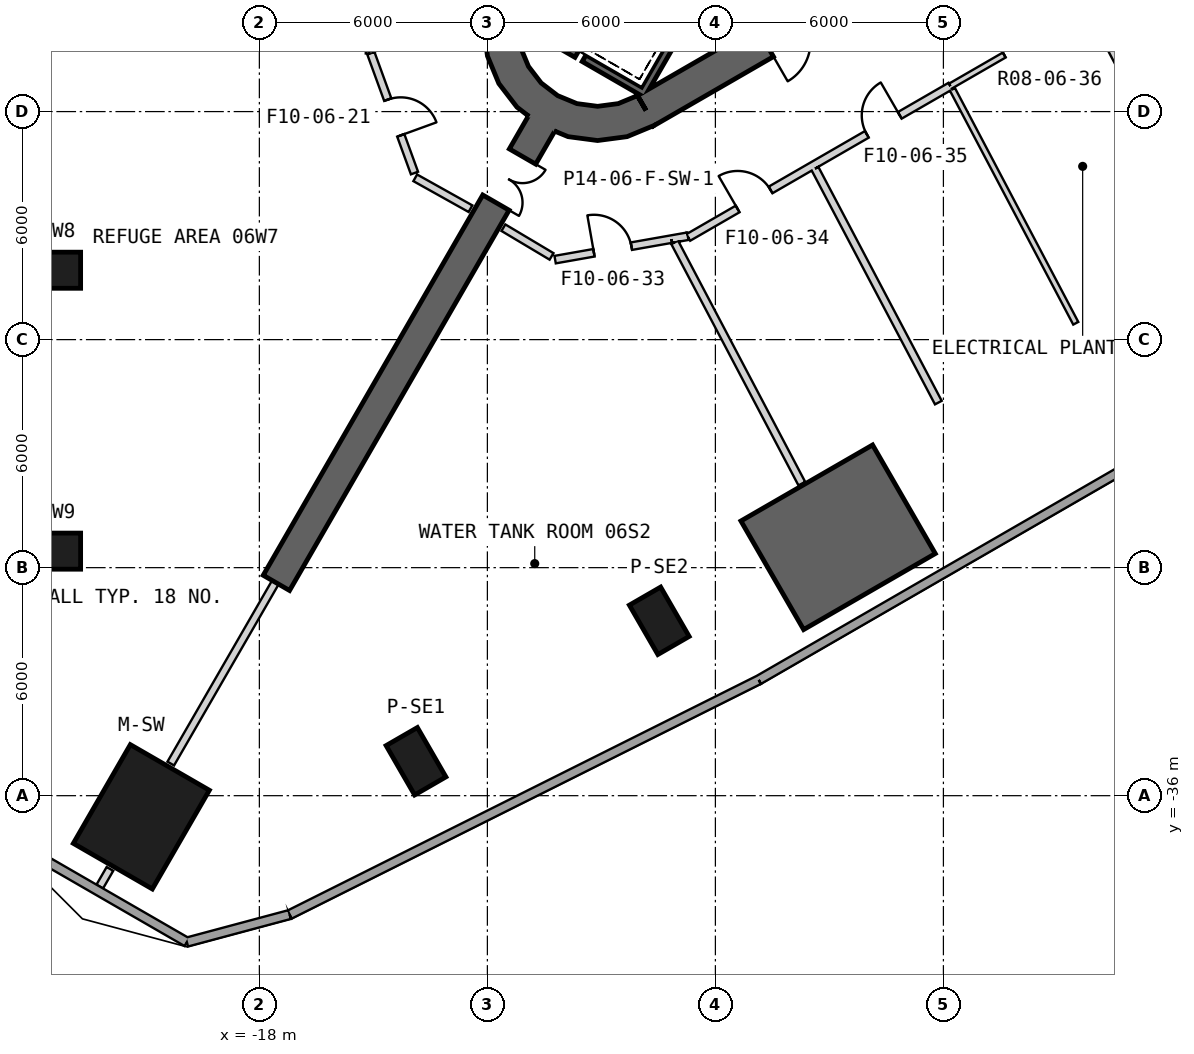
"""IFC4 building model, lengths in metres.
Left out: names, types, materials, properties, quantities, classifications, styles, units other than length and angle.
Written with IfcOpenShell. Run it as: python <this file> out.ifc"""

import sys

from ifc_helpers import new_model, si_unit, direction, frame, frame_2d, origin, origin_2d, place, context, subcontext, project, spatial, polyline, rectangle, outline, extrude, element, fill, save


model = new_model("IFC4")
c1 = context("Model", 3, precision=1e-05, world=origin(), true_north=direction((0.0, 1.0)))
c2 = subcontext(c1, "Body", "Model", "MODEL_VIEW")
j1 = project(units=[si_unit("LENGTHUNIT", "METRE"), si_unit("PLANEANGLEUNIT", "RADIAN")], contexts=[c1])
p1 = place(None, origin())
s1 = spatial("IfcSite", under=j1, at=p1, CompositionType="ELEMENT")
p2 = place(p1, origin())
s2 = spatial("IfcBuilding", under=s1, at=p2, CompositionType="ELEMENT")
p3 = place(p2, frame((0.0, 0.0, 39.5)))
s3 = spatial("IfcBuildingStorey", under=s2, at=p3, CompositionType="ELEMENT", Elevation=39.5)
p4 = place(p3, frame((-21.106, -36.556, 0.0), z_axis=(0.0, 0.0, 1.0), x_axis=(-0.5, -0.866025403784, 0.0)))
e1 = element("IfcColumn", 1, at=p4, inside=s3, PredefinedType="COLUMN", context=c2, shape_type="SweptSolid", body=[
    extrude(rectangle(XDim=3.0, YDim=2.4, at=origin_2d()), origin(), (0.0, 0.0, 1.0), 5.7),
])
for number, where, z_axis, x_axis in (
    (2, (-23.453, -22.174, 0.0), (0.0, 0.0, 1.0), (-1.0, 0.0, 0.0)),
    (3, (-23.453, -29.566, 0.0), (0.0, 0.0, 1.0), (-1.0, 0.0, 0.0)),
    (4, (-13.878, -35.094, 0.0), (0.0, 0.0, 1.0), (0.5, -0.866, 0.0)),
    (5, (-7.477, -31.398, 0.0), (0.0, 0.0, 1.0), (0.5, -0.866, 0.0)),
):
    element("IfcColumn", number, at=place(p3, frame(where, z_axis=z_axis, x_axis=x_axis)), inside=s3, PredefinedType="COLUMN", context=c2, shape_type="SweptSolid", body=[
        extrude(rectangle(XDim=1.5, YDim=0.95, at=origin_2d()), origin(), (0.0, 0.0, 1.0), 5.7),
    ])
p5 = place(p3, frame((-7.825, -17.97, 0.0), z_axis=(0.0, 0.0, 1.0), x_axis=(0.866028369851, 0.499994862586, 0.0)))
e6 = element("IfcWall", 6, at=p5, inside=s3, PredefinedType="SHEAR", context=c2, shape_type="SweptSolid", body=[
    extrude(rectangle(XDim=31.523, YDim=0.9, at=frame_2d((15.762, 0.0))), origin(), (0.0, 0.0, 1.0), 6.0),
])
p6 = place(p5, frame((26.712, 0.0, 0.0)))
e7 = element("IfcOpeningElement", 7, at=p6, cuts=e6, PredefinedType="OPENING", context=c2, shape_type="SweptSolid", body=[
    extrude(rectangle(XDim=1.2, YDim=2.4, at=frame_2d((0.6, 1.2))), frame((0.0, 0.46, 0.0), z_axis=(0.0, -1.0, 0.0), x_axis=(1.0, 0.0, 0.0)), (0.0, 0.0, 1.0), 0.92),
])
p7 = place(p5, frame((3.612, 0.0, 0.0)))
e8 = element("IfcOpeningElement", 8, at=p7, cuts=e6, PredefinedType="OPENING", context=c2, shape_type="SweptSolid", body=[
    extrude(rectangle(XDim=1.2, YDim=2.4, at=frame_2d((0.6, 1.2))), frame((0.0, 0.46, 0.0), z_axis=(0.0, -1.0, 0.0), x_axis=(1.0, 0.0, 0.0)), (0.0, 0.0, 1.0), 0.92),
])
p8 = place(p3, origin())
e9 = element("IfcWall", 9, at=p8, inside=s3, PredefinedType="SHEAR", context=c2, shape_type="SweptSolid", body=[
    extrude(outline(polyline([(-12.1, -15.762), (-11.998, -16.538), (-11.698, -17.262), (-11.221, -17.883), (-10.6, -18.36), (-9.876, -18.659), (-9.1, -18.762), (-8.323, -18.659), (-7.6, -18.36), (-8.05, -17.58), (-8.556, -17.79), (-9.1, -17.862), (-9.644, -17.79), (-10.15, -17.58), (-10.585, -17.247), (-10.919, -16.812), (-11.128, -16.305), (-11.2, -15.762), (-12.1, -15.762)])), origin(), (0.0, 0.0, 1.0), 6.0),
])
p9 = place(p3, frame((-10.575, -18.316, 0.0), z_axis=(0.0, 0.0, 1.0), x_axis=(-0.499996575515, -0.866027380903, 0.0)))
e10 = element("IfcWall", 10, at=p9, inside=s3, PredefinedType="SHEAR", context=c2, shape_type="SweptSolid", body=[
    extrude(rectangle(XDim=13.954, YDim=0.8, at=frame_2d((6.977, 0.0))), origin(), (0.0, 0.0, 1.0), 6.0),
])
p10 = place(p9, frame((1.0, 0.0, 0.0)))
e11 = element("IfcOpeningElement", 11, at=p10, cuts=e10, PredefinedType="OPENING", context=c2, shape_type="SweptSolid", body=[
    extrude(rectangle(XDim=1.4, YDim=2.4, at=frame_2d((0.7, 1.2))), frame((0.0, 0.41, 0.0), z_axis=(0.0, -1.0, 0.0), x_axis=(1.0, 0.0, 0.0)), (0.0, 0.0, 1.0), 0.82),
])
p11 = place(p3, origin())
e12 = element("IfcWall", 12, at=p11, inside=s3, PredefinedType="SHEAR", context=c2, shape_type="SweptSolid", body=[
    extrude(outline(polyline([(-3.678, -31.63), (-0.214, -29.63), (-1.864, -26.772), (-5.328, -28.772), (-3.678, -31.63)])), origin(), (0.0, 0.0, 1.0), 5.7),
])
p12 = place(p3, frame((-24.56, -37.167, 0.0), z_axis=(0.0, 0.0, 1.0), x_axis=(0.866010734295, -0.500025407441, 0.0)))
e13 = element("IfcWall", 13, at=p12, inside=s3, PredefinedType="SOLIDWALL", context=c2, shape_type="SweptSolid", body=[
    extrude(rectangle(XDim=5.371, YDim=0.24, at=frame_2d((2.686, 0.0))), origin(), (0.0, 0.0, 1.0), 5.7),
])
p13 = place(p3, frame((-19.908, -39.853, 0.0), z_axis=(0.0, 0.0, 1.0), x_axis=(0.965923146675, 0.25882904535, 0.0)))
e14 = element("IfcWall", 14, at=p13, inside=s3, PredefinedType="SOLIDWALL", context=c2, shape_type="SweptSolid", body=[
    extrude(rectangle(XDim=2.801, YDim=0.24, at=frame_2d((1.4, 0.0))), origin(), (0.0, 0.0, 1.0), 5.7),
])
p14 = place(p3, frame((-17.203, -39.128, 0.0), z_axis=(0.0, 0.0, 1.0), x_axis=(0.894377655106, 0.447312653573, 0.0)))
e15 = element("IfcWall", 15, at=p14, inside=s3, PredefinedType="SOLIDWALL", context=c2, shape_type="SweptSolid", body=[
    extrude(rectangle(XDim=13.802, YDim=0.24, at=frame_2d((6.901, 0.0))), origin(), (0.0, 0.0, 1.0), 5.7),
])
p15 = place(p3, frame((-4.859, -32.954, 0.0), z_axis=(0.0, 0.0, 1.0), x_axis=(0.865991780246, 0.500058233156, 0.0)))
e16 = element("IfcWall", 16, at=p15, inside=s3, PredefinedType="SOLIDWALL", context=c2, shape_type="SweptSolid", body=[
    extrude(rectangle(XDim=41.371, YDim=0.24, at=frame_2d((20.685, 0.0))), origin(), (0.0, 0.0, 1.0), 5.7),
])
p16 = place(p3, frame((-3.905, -10.563, -0.35), z_axis=(0.0, 0.0, 1.0), x_axis=(-0.500012932018, -0.866017937352, 0.0)))
e17 = element("IfcWall", 17, at=p16, inside=s3, PredefinedType="SHEAR", context=c2, shape_type="SweptSolid", body=[
    extrude(rectangle(XDim=8.1, YDim=0.2, at=frame_2d((4.05, 0.0))), origin(), (0.0, 0.0, 1.0), 6.05),
])
p17 = place(p3, frame((-11.282, -15.541, -0.35), z_axis=(0.0, 0.0, 1.0), x_axis=(0.866000578957, -0.500042995397, 0.0)))
e18 = element("IfcWall", 18, at=p17, inside=s3, PredefinedType="SHEAR", context=c2, shape_type="SweptSolid", body=[
    extrude(rectangle(XDim=1.89, YDim=0.2, at=frame_2d((0.945, 0.0))), origin(), (0.0, 0.0, 1.0), 6.05),
])
p18 = place(p3, frame((-9.455, -16.596, -0.35), z_axis=(0.0, 0.0, 1.0), x_axis=(0.866038843867, -0.499976720371, 0.0)))
e19 = element("IfcWall", 19, at=p18, inside=s3, PredefinedType="SHEAR", context=c2, shape_type="SweptSolid", body=[
    extrude(rectangle(XDim=1.69, YDim=0.2, at=frame_2d((0.845, 0.0))), origin(), (0.0, 0.0, 1.0), 6.05),
])
p19 = place(p3, frame((-15.1, 16.47, 0.0), z_axis=(0.0, 0.0, 1.0), x_axis=(0.0, -1.0, 0.0)))
e20 = element("IfcWall", 20, at=p19, inside=s3, PredefinedType="PARTITIONING", context=c2, shape_type="SweptSolid", body=[
    extrude(rectangle(XDim=32.94, YDim=0.2, at=frame_2d((16.47, 0.0))), origin(), (0.0, 0.0, 1.0), 4.88),
])
p20 = place(p19, frame((3.84, 0.0, 0.0)))
e21 = element("IfcOpeningElement", 21, at=p20, cuts=e20, PredefinedType="OPENING", context=c2, shape_type="SweptSolid", body=[
    extrude(rectangle(XDim=1.0, YDim=2.1, at=frame_2d((0.5, 1.05))), frame((0.0, 0.11, 0.0), z_axis=(0.0, -1.0, 0.0), x_axis=(1.0, 0.0, 0.0)), (0.0, 0.0, 1.0), 0.22),
])
p21 = place(p19, frame((9.805, 0.0, 0.0)))
e22 = element("IfcOpeningElement", 22, at=p21, cuts=e20, PredefinedType="OPENING", context=c2, shape_type="SweptSolid", body=[
    extrude(rectangle(XDim=1.0, YDim=2.1, at=frame_2d((0.5, 1.05))), frame((0.0, 0.11, 0.0), z_axis=(0.0, -1.0, 0.0), x_axis=(1.0, 0.0, 0.0)), (0.0, 0.0, 1.0), 0.22),
])
p22 = place(p19, frame((15.769, 0.0, 0.0)))
e23 = element("IfcOpeningElement", 23, at=p22, cuts=e20, PredefinedType="OPENING", context=c2, shape_type="SweptSolid", body=[
    extrude(rectangle(XDim=1.0, YDim=2.1, at=frame_2d((0.5, 1.05))), frame((0.0, 0.11, 0.0), z_axis=(0.0, -1.0, 0.0), x_axis=(1.0, 0.0, 0.0)), (0.0, 0.0, 1.0), 0.22),
])
p23 = place(p19, frame((21.734, 0.0, 0.0)))
e24 = element("IfcOpeningElement", 24, at=p23, cuts=e20, PredefinedType="OPENING", context=c2, shape_type="SweptSolid", body=[
    extrude(rectangle(XDim=1.0, YDim=2.1, at=frame_2d((0.5, 1.05))), frame((0.0, 0.11, 0.0), z_axis=(0.0, -1.0, 0.0), x_axis=(1.0, 0.0, 0.0)), (0.0, 0.0, 1.0), 0.22),
])
p24 = place(p19, frame((27.699, 0.0, 0.0)))
e25 = element("IfcOpeningElement", 25, at=p24, cuts=e20, PredefinedType="OPENING", context=c2, shape_type="SweptSolid", body=[
    extrude(rectangle(XDim=1.0, YDim=2.1, at=frame_2d((0.5, 1.05))), frame((0.0, 0.11, 0.0), z_axis=(0.0, -1.0, 0.0), x_axis=(1.0, 0.0, 0.0)), (0.0, 0.0, 1.0), 0.22),
])
p25 = place(p3, frame((-13.898, -19.743, 0.0), z_axis=(0.0, 0.0, 1.0), x_axis=(0.873055469417, -0.487620905337, 0.0)))
e26 = element("IfcWall", 26, at=p25, inside=s3, PredefinedType="PARTITIONING", context=c2, shape_type="SweptSolid", body=[
    extrude(rectangle(XDim=1.665, YDim=0.2, at=frame_2d((0.833, 0.0))), origin(), (0.0, 0.0, 1.0), 5.7),
])
p26 = place(p3, frame((-15.066, -16.464, 0.0), z_axis=(0.0, 0.0, 1.0), x_axis=(0.34204098686, -0.939685034098, 0.0)))
e27 = element("IfcWall", 27, at=p26, inside=s3, PredefinedType="PARTITIONING", context=c2, shape_type="SweptSolid", body=[
    extrude(rectangle(XDim=3.355, YDim=0.2, at=frame_2d((1.678, 0.0))), origin(), (0.0, 0.0, 1.0), 4.78),
])
p27 = place(p26, frame((1.3, 0.0, 0.0)))
e28 = element("IfcOpeningElement", 28, at=p27, cuts=e27, PredefinedType="OPENING", context=c2, shape_type="SweptSolid", body=[
    extrude(rectangle(XDim=1.0, YDim=2.1, at=frame_2d((0.5, 1.05))), frame((0.0, 0.11, 0.0), z_axis=(0.0, -1.0, 0.0), x_axis=(1.0, 0.0, 0.0)), (0.0, 0.0, 1.0), 0.22),
])
p28 = place(p3, frame((-22.2, -38.391, 0.0), z_axis=(0.0, 0.0, 1.0), x_axis=(0.499761856089, 0.866162852585, 0.0)))
e29 = element("IfcWall", 29, at=p28, inside=s3, PredefinedType="PARTITIONING", context=c2, shape_type="SweptSolid", body=[
    extrude(rectangle(XDim=0.536, YDim=0.2, at=frame_2d((0.268, 0.0))), origin(), (0.0, 0.0, 1.0), 5.7),
])
p29 = place(p3, frame((-20.332, -35.155, 0.0), z_axis=(0.0, 0.0, 1.0), x_axis=(0.499982128061, 0.866035721907, 0.0)))
e30 = element("IfcWall", 30, at=p29, inside=s3, PredefinedType="PARTITIONING", context=c2, shape_type="SweptSolid", body=[
    extrude(rectangle(XDim=5.507, YDim=0.2, at=frame_2d((2.753, 0.0))), origin(), (0.0, 0.0, 1.0), 5.27),
])
p30 = place(p3, frame((-10.217, -21.895, 0.0), z_axis=(0.0, 0.0, 1.0), x_axis=(0.984808859834, 0.173641900449, 0.0)))
e31 = element("IfcWall", 31, at=p30, inside=s3, PredefinedType="PARTITIONING", context=c2, shape_type="SweptSolid", body=[
    extrude(rectangle(XDim=3.107, YDim=0.2, at=frame_2d((1.554, 0.0))), origin(), (0.0, 0.0, 1.0), 4.78),
])
p31 = place(p30, frame((1.037, 0.0, 0.0)))
e32 = element("IfcOpeningElement", 32, at=p31, cuts=e31, PredefinedType="OPENING", context=c2, shape_type="SweptSolid", body=[
    extrude(rectangle(XDim=1.0, YDim=2.1, at=frame_2d((0.5, 1.05))), frame((0.0, 0.11, 0.0), z_axis=(0.0, -1.0, 0.0), x_axis=(1.0, 0.0, 0.0)), (0.0, 0.0, 1.0), 0.22),
])
p32 = place(p3, frame((-7.157, -21.355, 0.0), z_axis=(0.0, 0.0, 1.0), x_axis=(0.984783558818, 0.173785333909, 0.0)))
e33 = element("IfcWall", 33, at=p32, inside=s3, PredefinedType="PARTITIONING", context=c2, shape_type="SweptSolid", body=[
    extrude(rectangle(XDim=0.438, YDim=0.2, at=frame_2d((0.219, 0.0))), origin(), (0.0, 0.0, 1.0), 5.7),
])
p33 = place(p3, frame((-11.579, -21.055, 0.0), z_axis=(0.0, 0.0, 1.0), x_axis=(0.85883355706, -0.512254742552, 0.0)))
e34 = element("IfcWall", 34, at=p33, inside=s3, PredefinedType="PARTITIONING", context=c2, shape_type="SweptSolid", body=[
    extrude(rectangle(XDim=1.475, YDim=0.2, at=frame_2d((0.738, 0.0))), origin(), (0.0, 0.0, 1.0), 5.7),
])
p34 = place(p3, frame((-6.713, -21.312, 0.0), z_axis=(0.0, 0.0, 1.0), x_axis=(0.866023773276, 0.500002824113, 0.0)))
e35 = element("IfcWall", 35, at=p34, inside=s3, PredefinedType="PARTITIONING", context=c2, shape_type="SweptSolid", body=[
    extrude(rectangle(XDim=7.965, YDim=0.2, at=frame_2d((3.982, 0.0))), origin(), (0.0, 0.0, 1.0), 4.88),
])
p35 = place(p34, frame((1.5, 0.0, 0.0)))
e36 = element("IfcOpeningElement", 36, at=p35, cuts=e35, PredefinedType="OPENING", context=c2, shape_type="SweptSolid", body=[
    extrude(rectangle(XDim=1.0, YDim=2.1, at=frame_2d((0.5, 1.05))), frame((0.0, 0.11, 0.0), z_axis=(0.0, -1.0, 0.0), x_axis=(1.0, 0.0, 0.0)), (0.0, 0.0, 1.0), 0.22),
])
p36 = place(p34, frame((5.426, 0.0, 0.0)))
e37 = element("IfcOpeningElement", 37, at=p36, cuts=e35, PredefinedType="OPENING", context=c2, shape_type="SweptSolid", body=[
    extrude(rectangle(XDim=1.0, YDim=2.1, at=frame_2d((0.5, 1.05))), frame((0.0, 0.11, 0.0), z_axis=(0.0, -1.0, 0.0), x_axis=(1.0, 0.0, 0.0)), (0.0, 0.0, 1.0), 0.22),
])
p37 = place(p3, frame((0.184, -17.33, 0.0), z_axis=(0.0, 0.0, 1.0), x_axis=(0.866028817718, 0.499994086848, 0.0)))
e38 = element("IfcWall", 38, at=p37, inside=s3, PredefinedType="PLUMBINGWALL", context=c2, shape_type="SweptSolid", body=[
    extrude(rectangle(XDim=4.175, YDim=0.15, at=frame_2d((2.088, 0.0))), origin(), (0.0, 0.0, 1.0), 4.98),
])
p38 = place(p37, frame((1.636, 0.0, 0.0)))
e39 = element("IfcOpeningElement", 39, at=p38, cuts=e38, PredefinedType="OPENING", context=c2, shape_type="SweptSolid", body=[
    extrude(rectangle(XDim=0.8, YDim=2.1, at=frame_2d((0.4, 1.05))), frame((0.0, 0.085, 0.0), z_axis=(0.0, -1.0, 0.0), x_axis=(1.0, 0.0, 0.0)), (0.0, 0.0, 1.0), 0.17),
])
p39 = place(p3, frame((-3.726, -27.789, 0.0), z_axis=(0.0, 0.0, 1.0), x_axis=(-0.466234398463, 0.88466122651, 0.0)))
e40 = element("IfcWall", 40, at=p39, inside=s3, PredefinedType="PARTITIONING", context=c2, shape_type="SweptSolid", body=[
    extrude(rectangle(XDim=7.175, YDim=0.2, at=frame_2d((3.587, 0.0))), origin(), (0.0, 0.0, 1.0), 4.88),
])
p40 = place(p3, frame((-0.133, -25.657, 0.0), z_axis=(0.0, 0.0, 1.0), x_axis=(-0.466378215556, 0.884585417048, 0.0)))
e41 = element("IfcWall", 41, at=p40, inside=s3, PredefinedType="PARTITIONING", context=c2, shape_type="SweptSolid", body=[
    extrude(rectangle(XDim=6.959, YDim=0.2, at=frame_2d((3.479, 0.0))), origin(), (0.0, 0.0, 1.0), 4.88),
])
p41 = place(p3, frame((0.238, -17.414, 0.0), z_axis=(0.0, 0.0, 1.0), x_axis=(0.466378215556, -0.884585417048, 0.0)))
e42 = element("IfcWall", 42, at=p41, inside=s3, PredefinedType="PLUMBINGWALL", context=c2, shape_type="SweptSolid", body=[
    extrude(rectangle(XDim=6.959, YDim=0.15, at=frame_2d((3.479, 0.0))), origin(), (0.0, 0.0, 1.0), 5.7),
])
p42 = place(p3, frame((7.099, -21.482, 0.0), z_axis=(0.0, 0.0, 1.0), x_axis=(-0.466393246704, 0.884577492043, 0.0)))
e43 = element("IfcWall", 43, at=p42, inside=s3, PredefinedType="PLUMBINGWALL", context=c2, shape_type="SweptSolid", body=[
    extrude(rectangle(XDim=6.984, YDim=0.15, at=frame_2d((3.492, 0.0))), origin(), (0.0, 0.0, 1.0), 5.7),
])
p43 = place(p27, origin())
e44 = element("IfcDoor", 44, at=p43, inside=s3, OperationType="SINGLE_SWING_RIGHT", PredefinedType="USERDEFINED", context=c2, shape_type="SweptSolid", body=[
    extrude(rectangle(XDim=1.0, YDim=2.1, at=frame_2d((0.5, 1.05))), frame((0.0, 0.025, 0.0), z_axis=(0.0, -1.0, 0.0), x_axis=(1.0, 0.0, 0.0)), (0.0, 0.0, 1.0), 0.05),
])
fill(e28, e44)
p44 = place(p31, origin())
e45 = element("IfcDoor", 45, at=p44, inside=s3, OperationType="SINGLE_SWING_LEFT", PredefinedType="USERDEFINED", context=c2, shape_type="SweptSolid", body=[
    extrude(rectangle(XDim=1.0, YDim=2.1, at=frame_2d((0.5, 1.05))), frame((0.0, 0.025, 0.0), z_axis=(0.0, -1.0, 0.0), x_axis=(1.0, 0.0, 0.0)), (0.0, 0.0, 1.0), 0.05),
])
fill(e32, e45)
p45 = place(p35, origin())
e46 = element("IfcDoor", 46, at=p45, inside=s3, OperationType="SINGLE_SWING_LEFT", PredefinedType="USERDEFINED", context=c2, shape_type="SweptSolid", body=[
    extrude(rectangle(XDim=1.0, YDim=2.1, at=frame_2d((0.5, 1.05))), frame((0.0, 0.025, 0.0), z_axis=(0.0, -1.0, 0.0), x_axis=(1.0, 0.0, 0.0)), (0.0, 0.0, 1.0), 0.05),
])
fill(e36, e46)
p46 = place(p36, origin())
e47 = element("IfcDoor", 47, at=p46, inside=s3, OperationType="SINGLE_SWING_RIGHT", PredefinedType="USERDEFINED", context=c2, shape_type="SweptSolid", body=[
    extrude(rectangle(XDim=1.0, YDim=2.1, at=frame_2d((0.5, 1.05))), frame((0.0, 0.025, 0.0), z_axis=(0.0, -1.0, 0.0), x_axis=(1.0, 0.0, 0.0)), (0.0, 0.0, 1.0), 0.05),
])
fill(e37, e47)
p47 = place(p38, origin())
e48 = element("IfcDoor", 48, at=p47, inside=s3, OperationType="SINGLE_SWING_RIGHT", PredefinedType="USERDEFINED", context=c2, shape_type="SweptSolid", body=[
    extrude(rectangle(XDim=0.8, YDim=2.1, at=frame_2d((0.4, 1.05))), frame((0.0, 0.025, 0.0), z_axis=(0.0, -1.0, 0.0), x_axis=(1.0, 0.0, 0.0)), (0.0, 0.0, 1.0), 0.05),
])
fill(e39, e48)
p48 = place(p10, origin())
e49 = element("IfcDoor", 49, at=p48, inside=s3, OperationType="DOUBLE_DOOR_SINGLE_SWING", PredefinedType="NOTDEFINED", context=c2, shape_type="SweptSolid", body=[
    extrude(rectangle(XDim=1.4, YDim=2.4, at=frame_2d((0.7, 1.2))), frame((0.0, 0.025, 0.0), z_axis=(0.0, -1.0, 0.0), x_axis=(1.0, 0.0, 0.0)), (0.0, 0.0, 1.0), 0.05),
])
fill(e11, e49)
save(model, sys.argv[1])
